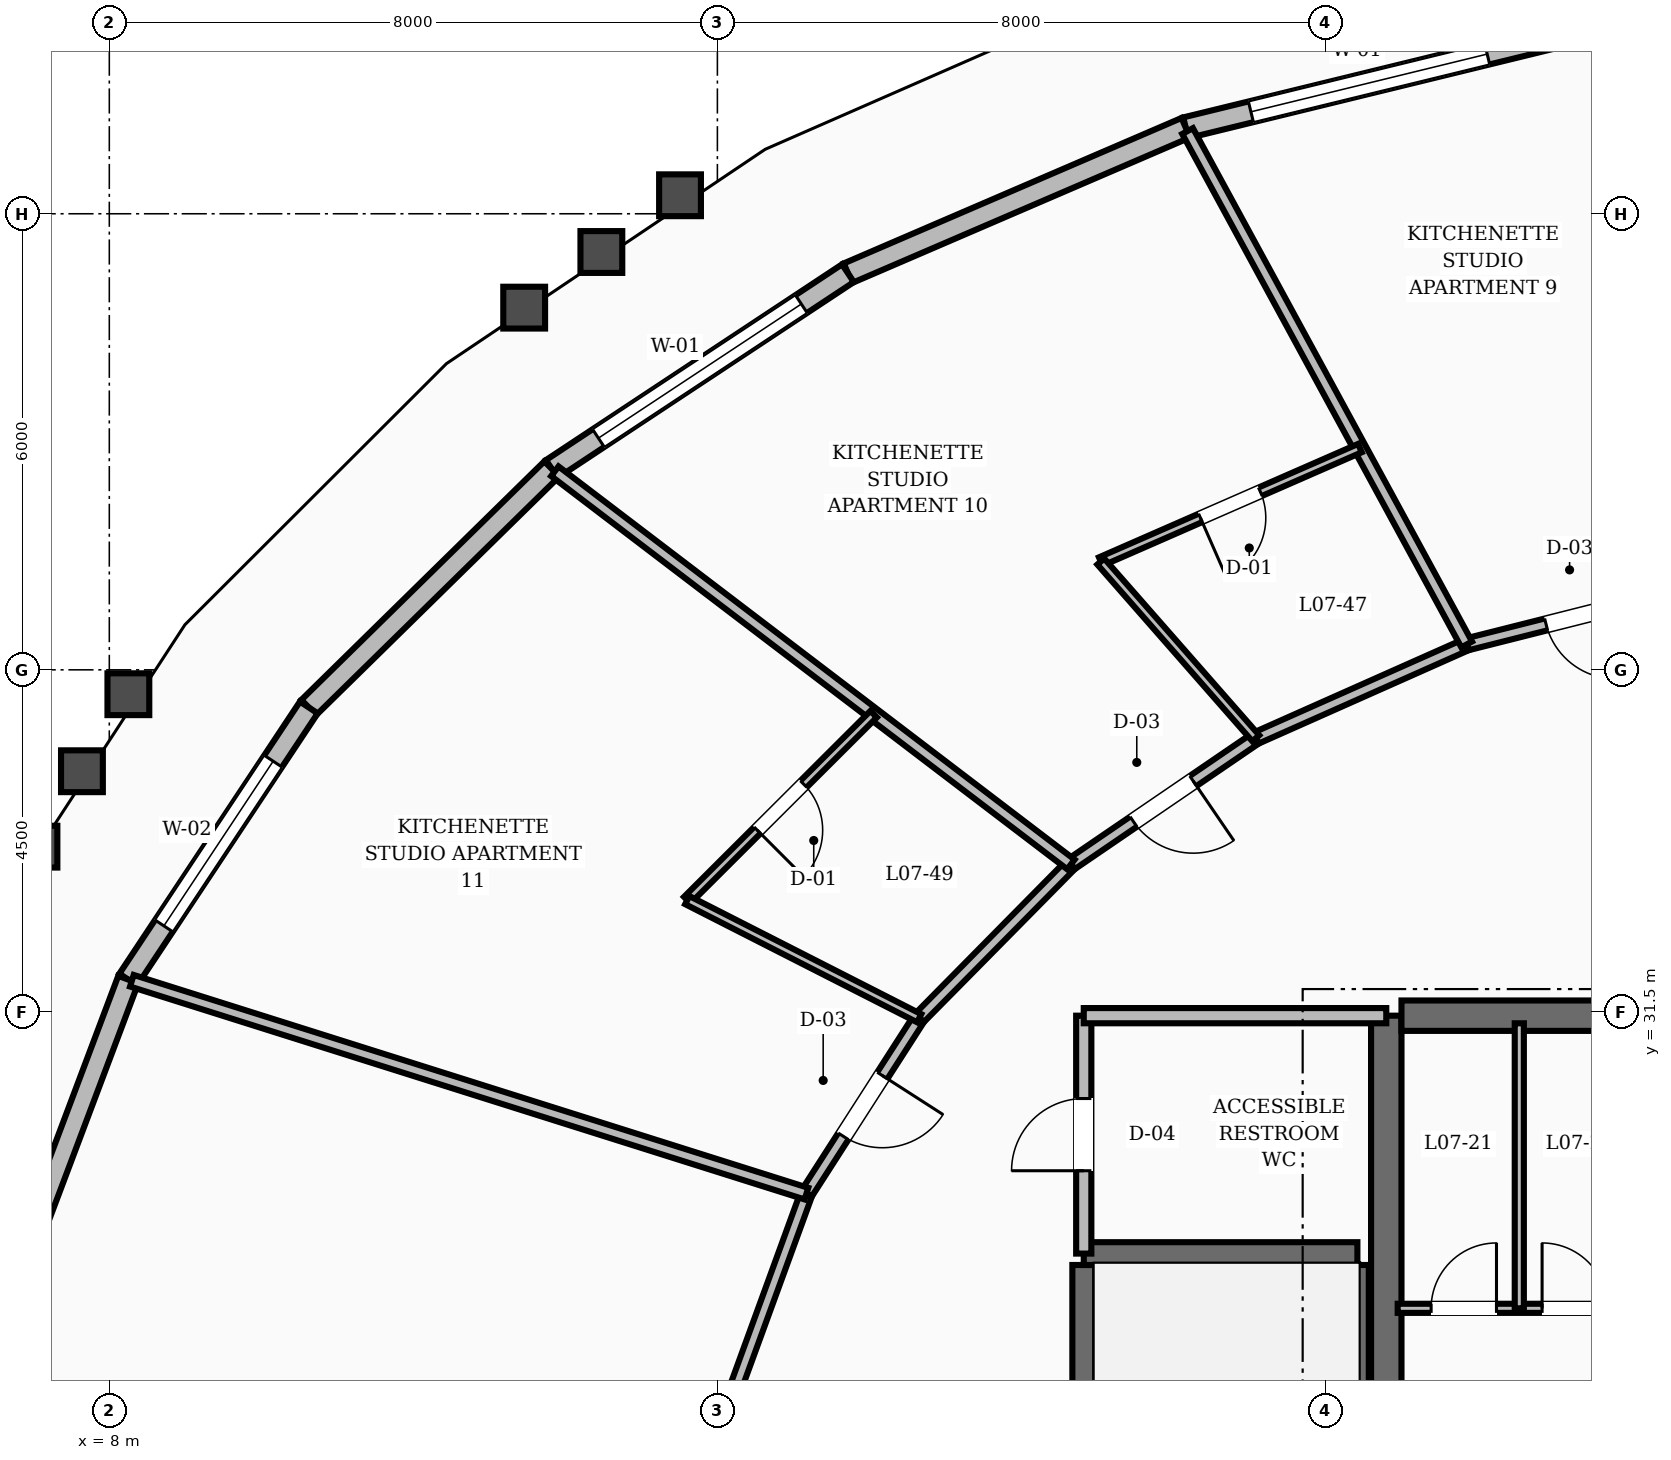
"""IFC4 building model, lengths in metres.
Left out: names, types, materials, properties, quantities, classifications, styles, units other than length and angle.
Written with IfcOpenShell. Run it as: python <this file> out.ifc"""

import sys

from ifc_helpers import new_model, si_unit, direction, frame, frame_2d, origin, place, context, subcontext, project, spatial, rectangle, extrude, element, fill, save


model = new_model("IFC4")
c1 = context("Model", 3, precision=1e-05, world=origin(), true_north=direction((0.0, 1.0)))
c2 = subcontext(c1, "Body", "Model", "MODEL_VIEW")
j1 = project(units=[si_unit("LENGTHUNIT", "METRE"), si_unit("PLANEANGLEUNIT", "RADIAN")], contexts=[c1])
p1 = place(None, origin())
s1 = spatial("IfcSite", under=j1, at=p1, CompositionType="ELEMENT")
p2 = place(p1, origin())
s2 = spatial("IfcBuilding", under=s1, at=p2, CompositionType="ELEMENT")
p3 = place(p2, frame((0.0, 0.0, 34.0)))
s3 = spatial("IfcBuildingStorey", under=s2, at=p3, CompositionType="ELEMENT", Elevation=34.0)
p4 = place(p3, frame((24.8, 25.15, 0.0), z_axis=(0.0, 0.0, 1.0), x_axis=(0.0, 1.0, 0.0)))
e1 = element("IfcWall", 1, at=p4, inside=s3, PredefinedType="SHEAR", context=c2, shape_type="SweptSolid", body=[
    extrude(rectangle(XDim=6.3, YDim=0.4, at=frame_2d((3.15, 0.0))), origin(), (0.0, 0.0, 1.0), 3.6),
])
p5 = place(p3, frame((25.0, 31.45, 0.0), z_axis=(0.0, 0.0, 1.0), x_axis=(1.0, 0.0, 0.0)))
e2 = element("IfcWall", 2, at=p5, inside=s3, PredefinedType="SHEAR", context=c2, shape_type="SweptSolid", body=[
    extrude(rectangle(XDim=3.2, YDim=0.4, at=frame_2d((1.6, 0.0))), origin(), (0.0, 0.0, 1.0), 3.6),
])
for number, where, z_axis, x_axis in (
    (3, (20.82, 19.43, 0.0), (0.0, 0.0, 1.0), (0.0, 1.0, 0.0)),
    (4, (24.42, 19.43, 0.0), (0.0, 0.0, 1.0), (0.0, 1.0, 0.0)),
):
    element("IfcWall", number, at=place(p3, frame(where, z_axis=z_axis, x_axis=x_axis)), inside=s3, PredefinedType="SHEAR", context=c2, shape_type="SweptSolid", body=[
        extrude(rectangle(XDim=8.74, YDim=0.3, at=frame_2d((4.37, 0.0))), origin(), (0.0, 0.0, 1.0), 3.6),
    ])
p6 = place(p3, frame((20.82, 28.32, 0.0), z_axis=(0.0, 0.0, 1.0), x_axis=(1.0, 0.0, 0.0)))
e5 = element("IfcWall", 5, at=p6, inside=s3, PredefinedType="SHEAR", context=c2, shape_type="SweptSolid", body=[
    extrude(rectangle(XDim=3.6, YDim=0.3, at=frame_2d((1.8, 0.0))), origin(), (0.0, 0.0, 1.0), 3.6),
])
p7 = place(p3, frame((26.985, 44.31, 0.0), z_axis=(0.0, 0.0, 1.0), x_axis=(-0.971416145281, -0.237382966297, 0.0)))
e6 = element("IfcWall", 6, at=p7, inside=s3, PredefinedType="STANDARD", context=c2, shape_type="SweptSolid", body=[
    extrude(rectangle(XDim=4.964, YDim=0.28, at=frame_2d((2.482, 0.0))), origin(), (0.0, 0.0, 1.0), 2.65),
])
p8 = place(p7, frame((0.882, 0.0, 0.8)))
e7 = element("IfcOpeningElement", 7, at=p8, cuts=e6, PredefinedType="OPENING", context=c2, shape_type="SweptSolid", body=[
    extrude(rectangle(XDim=3.2, YDim=1.65, at=frame_2d((1.6, 0.825))), frame((0.0, 0.15, 0.0), z_axis=(0.0, -1.0, 0.0), x_axis=(1.0, 0.0, 0.0)), (0.0, 0.0, 1.0), 0.3),
])
p9 = place(p3, frame((22.162, 43.132, 0.0), z_axis=(0.0, 0.0, 1.0), x_axis=(-0.918488745996, -0.395447118435, 0.0)))
e8 = element("IfcWall", 8, at=p9, inside=s3, PredefinedType="STANDARD", context=c2, shape_type="SweptSolid", body=[
    extrude(rectangle(XDim=4.839, YDim=0.28, at=frame_2d((2.419, 0.0))), origin(), (0.0, 0.0, 1.0), 2.65),
])
p10 = place(p3, frame((17.718, 41.218, 0.0), z_axis=(0.0, 0.0, 1.0), x_axis=(-0.834191456714, -0.551474943716, 0.0)))
e9 = element("IfcWall", 9, at=p10, inside=s3, PredefinedType="STANDARD", context=c2, shape_type="SweptSolid", body=[
    extrude(rectangle(XDim=4.67, YDim=0.28, at=frame_2d((2.335, 0.0))), origin(), (0.0, 0.0, 1.0), 2.65),
])
p11 = place(p10, frame((0.735, 0.0, 0.8)))
e10 = element("IfcOpeningElement", 10, at=p11, cuts=e9, PredefinedType="OPENING", context=c2, shape_type="SweptSolid", body=[
    extrude(rectangle(XDim=3.2, YDim=1.65, at=frame_2d((1.6, 0.825))), frame((0.0, 0.15, 0.0), z_axis=(0.0, -1.0, 0.0), x_axis=(1.0, 0.0, 0.0)), (0.0, 0.0, 1.0), 0.3),
])
p12 = place(p3, frame((13.822, 38.643, 0.0), z_axis=(0.0, 0.0, 1.0), x_axis=(-0.713670465871, -0.700481595864, 0.0)))
e11 = element("IfcWall", 11, at=p12, inside=s3, PredefinedType="STANDARD", context=c2, shape_type="SweptSolid", body=[
    extrude(rectangle(XDim=4.48, YDim=0.28, at=frame_2d((2.24, 0.0))), origin(), (0.0, 0.0, 1.0), 2.65),
])
p13 = place(p3, frame((10.625, 35.505, 0.0), z_axis=(0.0, 0.0, 1.0), x_axis=(-0.55292873667, -0.833228547377, 0.0)))
e12 = element("IfcWall", 12, at=p13, inside=s3, PredefinedType="STANDARD", context=c2, shape_type="SweptSolid", body=[
    extrude(rectangle(XDim=4.297, YDim=0.28, at=frame_2d((2.148, 0.0))), origin(), (0.0, 0.0, 1.0), 2.65),
])
p14 = place(p13, frame((0.848, 0.0, 0.8)))
e13 = element("IfcOpeningElement", 13, at=p14, cuts=e12, PredefinedType="OPENING", context=c2, shape_type="SweptSolid", body=[
    extrude(rectangle(XDim=2.6, YDim=1.65, at=frame_2d((1.3, 0.825))), frame((0.0, 0.15, 0.0), z_axis=(0.0, -1.0, 0.0), x_axis=(1.0, 0.0, 0.0)), (0.0, 0.0, 1.0), 0.3),
])
p15 = place(p3, frame((8.249, 31.925, 0.0), z_axis=(0.0, 0.0, 1.0), x_axis=(-0.352412178014, -0.935844889278, 0.0)))
e14 = element("IfcWall", 14, at=p15, inside=s3, PredefinedType="STANDARD", context=c2, shape_type="SweptSolid", body=[
    extrude(rectangle(XDim=4.151, YDim=0.28, at=frame_2d((2.076, 0.0))), origin(), (0.0, 0.0, 1.0), 2.65),
])
p16 = place(p3, frame((20.82, 28.32, 0.0), z_axis=(0.0, 0.0, 1.0), x_axis=(0.0, 1.0, 0.0)))
e15 = element("IfcWall", 15, at=p16, inside=s3, PredefinedType="SOLIDWALL", context=c2, shape_type="SweptSolid", body=[
    extrude(rectangle(XDim=3.13, YDim=0.2, at=frame_2d((1.565, 0.0))), origin(), (0.0, 0.0, 1.0), 2.61),
])
p17 = place(p16, frame((1.09, 0.0, 0.0)))
e16 = element("IfcOpeningElement", 16, at=p17, cuts=e15, PredefinedType="OPENING", context=c2, shape_type="SweptSolid", body=[
    extrude(rectangle(XDim=0.95, YDim=2.1, at=frame_2d((0.475, 1.05))), frame((0.0, 0.11, 0.0), z_axis=(0.0, -1.0, 0.0), x_axis=(1.0, 0.0, 0.0)), (0.0, 0.0, 1.0), 0.22),
])
p18 = place(p3, frame((20.82, 31.45, 0.0), z_axis=(0.0, 0.0, 1.0), x_axis=(1.0, 0.0, 0.0)))
e17 = element("IfcWall", 17, at=p18, inside=s3, PredefinedType="SOLIDWALL", context=c2, shape_type="SweptSolid", body=[
    extrude(rectangle(XDim=3.98, YDim=0.2, at=frame_2d((1.99, 0.0))), origin(), (0.0, 0.0, 1.0), 2.61),
])
p19 = place(p3, frame((24.95, 27.6, 0.0), z_axis=(0.0, 0.0, 1.0), x_axis=(1.0, 0.0, 0.0)))
e18 = element("IfcWall", 18, at=p19, inside=s3, PredefinedType="PARTITIONING", context=c2, shape_type="SweptSolid", body=[
    extrude(rectangle(XDim=3.2, YDim=0.12, at=frame_2d((1.6, 0.0))), origin(), (0.0, 0.0, 1.0), 2.61),
])
p20 = place(p19, frame((0.44, 0.0, 0.0)))
e19 = element("IfcOpeningElement", 19, at=p20, cuts=e18, PredefinedType="OPENING", context=c2, shape_type="SweptSolid", body=[
    extrude(rectangle(XDim=0.86, YDim=2.1, at=frame_2d((0.43, 1.05))), frame((0.0, 0.07, 0.0), z_axis=(0.0, -1.0, 0.0), x_axis=(1.0, 0.0, 0.0)), (0.0, 0.0, 1.0), 0.14),
])
p21 = place(p19, frame((1.9, 0.0, 0.0)))
e20 = element("IfcOpeningElement", 20, at=p21, cuts=e18, PredefinedType="OPENING", context=c2, shape_type="SweptSolid", body=[
    extrude(rectangle(XDim=0.86, YDim=2.1, at=frame_2d((0.43, 1.05))), frame((0.0, 0.07, 0.0), z_axis=(0.0, -1.0, 0.0), x_axis=(1.0, 0.0, 0.0)), (0.0, 0.0, 1.0), 0.14),
])
p22 = place(p3, frame((26.55, 27.6, 0.0), z_axis=(0.0, 0.0, 1.0), x_axis=(0.0, 1.0, 0.0)))
e21 = element("IfcWall", 21, at=p22, inside=s3, PredefinedType="PARTITIONING", context=c2, shape_type="SweptSolid", body=[
    extrude(rectangle(XDim=3.75, YDim=0.12, at=frame_2d((1.875, 0.0))), origin(), (0.0, 0.0, 1.0), 2.61),
])
p23 = place(p3, frame((28.869, 37.094, 0.0), z_axis=(0.0, 0.0, 1.0), x_axis=(-0.969608333194, -0.244662380029, 0.0)))
e22 = element("IfcWall", 22, at=p23, inside=s3, PredefinedType="SOLIDWALL", context=c2, shape_type="SweptSolid", body=[
    extrude(rectangle(XDim=3.105, YDim=0.16, at=frame_2d((1.553, 0.0))), origin(), (0.0, 0.0, 1.0), 2.61),
])
p24 = place(p23, frame((1.078, 0.0, 0.0)))
e23 = element("IfcOpeningElement", 23, at=p24, cuts=e22, PredefinedType="OPENING", context=c2, shape_type="SweptSolid", body=[
    extrude(rectangle(XDim=0.95, YDim=2.1, at=frame_2d((0.475, 1.05))), frame((0.0, 0.09, 0.0), z_axis=(0.0, -1.0, 0.0), x_axis=(1.0, 0.0, 0.0)), (0.0, 0.0, 1.0), 0.18),
])
p25 = place(p3, frame((25.858, 36.334, 0.0), z_axis=(0.0, 0.0, 1.0), x_axis=(-0.913768445178, -0.406235434936, 0.0)))
e24 = element("IfcWall", 24, at=p25, inside=s3, PredefinedType="SOLIDWALL", context=c2, shape_type="SweptSolid", body=[
    extrude(rectangle(XDim=3.037, YDim=0.16, at=frame_2d((1.519, 0.0))), origin(), (0.0, 0.0, 1.0), 2.61),
])
p26 = place(p3, frame((23.083, 35.1, 0.0), z_axis=(0.0, 0.0, 1.0), x_axis=(-0.825929039072, -0.563774088104, 0.0)))
e25 = element("IfcWall", 25, at=p26, inside=s3, PredefinedType="SOLIDWALL", context=c2, shape_type="SweptSolid", body=[
    extrude(rectangle(XDim=2.945, YDim=0.16, at=frame_2d((1.472, 0.0))), origin(), (0.0, 0.0, 1.0), 2.61),
])
p27 = place(p26, frame((0.997, 0.0, 0.0)))
e26 = element("IfcOpeningElement", 26, at=p27, cuts=e25, PredefinedType="OPENING", context=c2, shape_type="SweptSolid", body=[
    extrude(rectangle(XDim=0.95, YDim=2.1, at=frame_2d((0.475, 1.05))), frame((0.0, 0.09, 0.0), z_axis=(0.0, -1.0, 0.0), x_axis=(1.0, 0.0, 0.0)), (0.0, 0.0, 1.0), 0.18),
])
p28 = place(p3, frame((20.651, 33.44, 0.0), z_axis=(0.0, 0.0, 1.0), x_axis=(-0.702366174226, -0.711815816981, 0.0)))
e27 = element("IfcWall", 27, at=p28, inside=s3, PredefinedType="SOLIDWALL", context=c2, shape_type="SweptSolid", body=[
    extrude(rectangle(XDim=2.842, YDim=0.16, at=frame_2d((1.421, 0.0))), origin(), (0.0, 0.0, 1.0), 2.61),
])
p29 = place(p3, frame((18.655, 31.417, 0.0), z_axis=(0.0, 0.0, 1.0), x_axis=(-0.540595670038, -0.841282545603, 0.0)))
e28 = element("IfcWall", 28, at=p29, inside=s3, PredefinedType="SOLIDWALL", context=c2, shape_type="SweptSolid", body=[
    extrude(rectangle(XDim=2.744, YDim=0.16, at=frame_2d((1.372, 0.0))), origin(), (0.0, 0.0, 1.0), 2.61),
])
p30 = place(p29, frame((0.897, 0.0, 0.0)))
e29 = element("IfcOpeningElement", 29, at=p30, cuts=e28, PredefinedType="OPENING", context=c2, shape_type="SweptSolid", body=[
    extrude(rectangle(XDim=0.95, YDim=2.1, at=frame_2d((0.475, 1.05))), frame((0.0, 0.09, 0.0), z_axis=(0.0, -1.0, 0.0), x_axis=(1.0, 0.0, 0.0)), (0.0, 0.0, 1.0), 0.18),
])
p31 = place(p3, frame((17.172, 29.109, 0.0), z_axis=(0.0, 0.0, 1.0), x_axis=(-0.342617982381, -0.939474809747, 0.0)))
e30 = element("IfcWall", 30, at=p31, inside=s3, PredefinedType="SOLIDWALL", context=c2, shape_type="SweptSolid", body=[
    extrude(rectangle(XDim=2.666, YDim=0.16, at=frame_2d((1.333, 0.0))), origin(), (0.0, 0.0, 1.0), 2.61),
])
p32 = place(p3, frame((25.858, 36.334, 0.0), z_axis=(0.0, 0.0, 1.0), x_axis=(-0.477665740343, 0.878541655531, 0.0)))
e31 = element("IfcWall", 31, at=p32, inside=s3, PredefinedType="SOLIDWALL", context=c2, shape_type="SweptSolid", body=[
    extrude(rectangle(XDim=7.688, YDim=0.16, at=frame_2d((3.844, 0.0))), origin(), (0.0, 0.0, 1.0), 2.61),
])
p33 = place(p3, frame((24.454, 38.917, 0.0), z_axis=(0.0, 0.0, 1.0), x_axis=(-0.916101619969, -0.400946158342, 0.0)))
e32 = element("IfcWall", 32, at=p33, inside=s3, PredefinedType="PARTITIONING", context=c2, shape_type="SweptSolid", body=[
    extrude(rectangle(XDim=3.722, YDim=0.12, at=frame_2d((1.861, 0.0))), origin(), (0.0, 0.0, 1.0), 2.61),
])
p34 = place(p33, frame((1.431, 0.0, 0.0)))
e33 = element("IfcOpeningElement", 33, at=p34, cuts=e32, PredefinedType="OPENING", context=c2, shape_type="SweptSolid", body=[
    extrude(rectangle(XDim=0.86, YDim=2.1, at=frame_2d((0.43, 1.05))), frame((0.0, 0.07, 0.0), z_axis=(0.0, -1.0, 0.0), x_axis=(1.0, 0.0, 0.0)), (0.0, 0.0, 1.0), 0.14),
])
p35 = place(p3, frame((23.083, 35.1, 0.0), z_axis=(0.0, 0.0, 1.0), x_axis=(-0.659365011607, 0.751822972161, 0.0)))
e34 = element("IfcWall", 34, at=p35, inside=s3, PredefinedType="PARTITIONING", context=c2, shape_type="SweptSolid", body=[
    extrude(rectangle(XDim=3.092, YDim=0.12, at=frame_2d((1.546, 0.0))), origin(), (0.0, 0.0, 1.0), 2.61),
])
p36 = place(p3, frame((20.651, 33.44, 0.0), z_axis=(0.0, 0.0, 1.0), x_axis=(-0.795456671163, 0.606010465506, 0.0)))
e35 = element("IfcWall", 35, at=p36, inside=s3, PredefinedType="SOLIDWALL", context=c2, shape_type="SweptSolid", body=[
    extrude(rectangle(XDim=8.535, YDim=0.16, at=frame_2d((4.268, 0.0))), origin(), (0.0, 0.0, 1.0), 2.61),
])
p37 = place(p3, frame((18.056, 35.417, 0.0), z_axis=(0.0, 0.0, 1.0), x_axis=(-0.707916773962, -0.706295859497, 0.0)))
e36 = element("IfcWall", 36, at=p37, inside=s3, PredefinedType="PARTITIONING", context=c2, shape_type="SweptSolid", body=[
    extrude(rectangle(XDim=3.464, YDim=0.12, at=frame_2d((1.732, 0.0))), origin(), (0.0, 0.0, 1.0), 2.61),
])
p38 = place(p37, frame((1.302, 0.0, 0.0)))
e37 = element("IfcOpeningElement", 37, at=p38, cuts=e36, PredefinedType="OPENING", context=c2, shape_type="SweptSolid", body=[
    extrude(rectangle(XDim=0.86, YDim=2.1, at=frame_2d((0.43, 1.05))), frame((0.0, 0.07, 0.0), z_axis=(0.0, -1.0, 0.0), x_axis=(1.0, 0.0, 0.0)), (0.0, 0.0, 1.0), 0.14),
])
p39 = place(p3, frame((18.655, 31.417, 0.0), z_axis=(0.0, 0.0, 1.0), x_axis=(-0.891180936705, 0.453648033231, 0.0)))
e38 = element("IfcWall", 38, at=p39, inside=s3, PredefinedType="PARTITIONING", context=c2, shape_type="SweptSolid", body=[
    extrude(rectangle(XDim=3.424, YDim=0.12, at=frame_2d((1.712, 0.0))), origin(), (0.0, 0.0, 1.0), 2.61),
])
p40 = place(p3, frame((17.172, 29.109, 0.0), z_axis=(0.0, 0.0, 1.0), x_axis=(-0.953639740523, 0.300950569522, 0.0)))
e39 = element("IfcWall", 39, at=p40, inside=s3, PredefinedType="SOLIDWALL", context=c2, shape_type="SweptSolid", body=[
    extrude(rectangle(XDim=9.306, YDim=0.16, at=frame_2d((4.653, 0.0))), origin(), (0.0, 0.0, 1.0), 2.61),
])
p41 = place(p8, origin())
e40 = element("IfcWindow", 40, at=p41, inside=s3, PartitioningType="SINGLE_PANEL", PredefinedType="WINDOW", context=c2, shape_type="SweptSolid", body=[
    extrude(rectangle(XDim=3.2, YDim=1.65, at=frame_2d((1.6, 0.825))), frame((0.0, 0.03, 0.0), z_axis=(0.0, -1.0, 0.0), x_axis=(1.0, 0.0, 0.0)), (0.0, 0.0, 1.0), 0.06),
])
fill(e7, e40)
p42 = place(p11, origin())
e41 = element("IfcWindow", 41, at=p42, inside=s3, PartitioningType="SINGLE_PANEL", PredefinedType="WINDOW", context=c2, shape_type="SweptSolid", body=[
    extrude(rectangle(XDim=3.2, YDim=1.65, at=frame_2d((1.6, 0.825))), frame((0.0, 0.03, 0.0), z_axis=(0.0, -1.0, 0.0), x_axis=(1.0, 0.0, 0.0)), (0.0, 0.0, 1.0), 0.06),
])
fill(e10, e41)
p43 = place(p14, origin())
e42 = element("IfcWindow", 42, at=p43, inside=s3, PartitioningType="SINGLE_PANEL", PredefinedType="WINDOW", context=c2, shape_type="SweptSolid", body=[
    extrude(rectangle(XDim=2.6, YDim=1.65, at=frame_2d((1.3, 0.825))), frame((0.0, 0.03, 0.0), z_axis=(0.0, -1.0, 0.0), x_axis=(1.0, 0.0, 0.0)), (0.0, 0.0, 1.0), 0.06),
])
fill(e13, e42)
p44 = place(p17, origin())
e43 = element("IfcDoor", 43, at=p44, inside=s3, OperationType="SINGLE_SWING_LEFT", PredefinedType="DOOR", context=c2, shape_type="SweptSolid", body=[
    extrude(rectangle(XDim=0.95, YDim=2.1, at=frame_2d((0.475, 1.05))), frame((0.0, 0.025, 0.0), z_axis=(0.0, -1.0, 0.0), x_axis=(1.0, 0.0, 0.0)), (0.0, 0.0, 1.0), 0.05),
])
fill(e16, e43)
p45 = place(p20, origin())
e44 = element("IfcDoor", 44, at=p45, inside=s3, OperationType="SINGLE_SWING_RIGHT", PredefinedType="DOOR", context=c2, shape_type="SweptSolid", body=[
    extrude(rectangle(XDim=0.86, YDim=2.1, at=frame_2d((0.43, 1.05))), frame((0.0, 0.025, 0.0), z_axis=(0.0, -1.0, 0.0), x_axis=(1.0, 0.0, 0.0)), (0.0, 0.0, 1.0), 0.05),
])
fill(e19, e44)
p46 = place(p21, origin())
e45 = element("IfcDoor", 45, at=p46, inside=s3, OperationType="SINGLE_SWING_LEFT", PredefinedType="DOOR", context=c2, shape_type="SweptSolid", body=[
    extrude(rectangle(XDim=0.86, YDim=2.1, at=frame_2d((0.43, 1.05))), frame((0.0, 0.025, 0.0), z_axis=(0.0, -1.0, 0.0), x_axis=(1.0, 0.0, 0.0)), (0.0, 0.0, 1.0), 0.05),
])
fill(e20, e45)
p47 = place(p24, origin())
e46 = element("IfcDoor", 46, at=p47, inside=s3, OperationType="SINGLE_SWING_LEFT", PredefinedType="DOOR", context=c2, shape_type="SweptSolid", body=[
    extrude(rectangle(XDim=0.95, YDim=2.1, at=frame_2d((0.475, 1.05))), frame((0.0, 0.025, 0.0), z_axis=(0.0, -1.0, 0.0), x_axis=(1.0, 0.0, 0.0)), (0.0, 0.0, 1.0), 0.05),
])
fill(e23, e46)
p48 = place(p34, origin())
e47 = element("IfcDoor", 47, at=p48, inside=s3, OperationType="SINGLE_SWING_RIGHT", PredefinedType="DOOR", context=c2, shape_type="SweptSolid", body=[
    extrude(rectangle(XDim=0.86, YDim=2.1, at=frame_2d((0.43, 1.05))), frame((0.0, 0.025, 0.0), z_axis=(0.0, -1.0, 0.0), x_axis=(1.0, 0.0, 0.0)), (0.0, 0.0, 1.0), 0.05),
])
fill(e33, e47)
p49 = place(p27, origin())
e48 = element("IfcDoor", 48, at=p49, inside=s3, OperationType="SINGLE_SWING_LEFT", PredefinedType="DOOR", context=c2, shape_type="SweptSolid", body=[
    extrude(rectangle(XDim=0.95, YDim=2.1, at=frame_2d((0.475, 1.05))), frame((0.0, 0.025, 0.0), z_axis=(0.0, -1.0, 0.0), x_axis=(1.0, 0.0, 0.0)), (0.0, 0.0, 1.0), 0.05),
])
fill(e26, e48)
p50 = place(p38, origin())
e49 = element("IfcDoor", 49, at=p50, inside=s3, OperationType="SINGLE_SWING_RIGHT", PredefinedType="DOOR", context=c2, shape_type="SweptSolid", body=[
    extrude(rectangle(XDim=0.86, YDim=2.1, at=frame_2d((0.43, 1.05))), frame((0.0, 0.025, 0.0), z_axis=(0.0, -1.0, 0.0), x_axis=(1.0, 0.0, 0.0)), (0.0, 0.0, 1.0), 0.05),
])
fill(e37, e49)
p51 = place(p30, origin())
e50 = element("IfcDoor", 50, at=p51, inside=s3, OperationType="SINGLE_SWING_LEFT", PredefinedType="DOOR", context=c2, shape_type="SweptSolid", body=[
    extrude(rectangle(XDim=0.95, YDim=2.1, at=frame_2d((0.475, 1.05))), frame((0.0, 0.025, 0.0), z_axis=(0.0, -1.0, 0.0), x_axis=(1.0, 0.0, 0.0)), (0.0, 0.0, 1.0), 0.05),
])
fill(e29, e50)
save(model, sys.argv[1])
